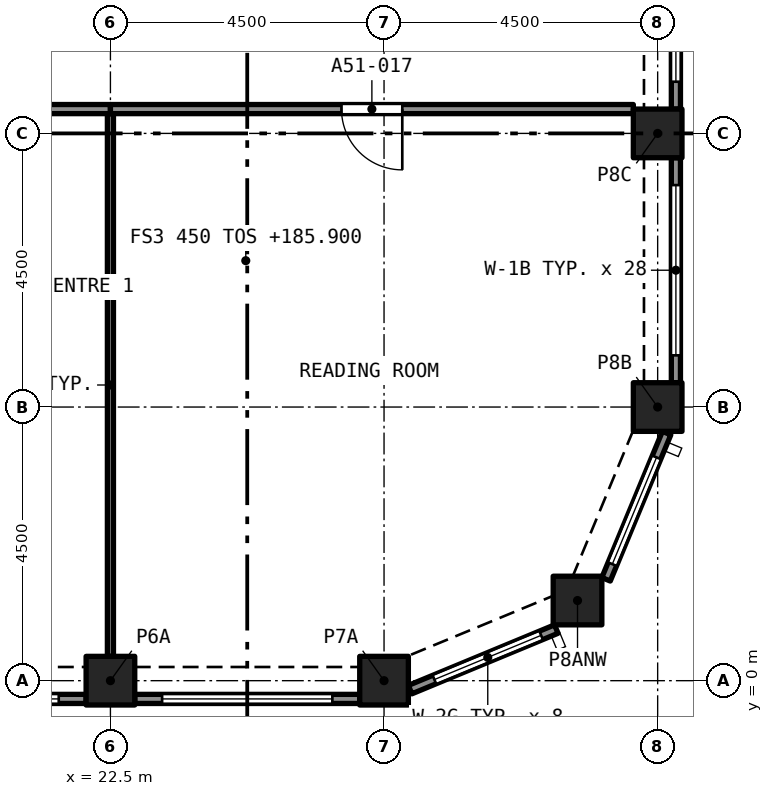
"""IFC4 building model, lengths in metres.
Left out: names, types, materials, properties, quantities, classifications, styles, units other than length and angle.
Written with IfcOpenShell. Run it as: python <this file> out.ifc"""

import sys

from ifc_helpers import new_model, si_unit, direction, frame, frame_2d, origin, origin_2d, place, context, subcontext, project, spatial, rectangle, extrude, element, fill, save


model = new_model("IFC4")
c1 = context("Model", 3, precision=1e-05, world=origin(), true_north=direction((0.0, 1.0)))
c2 = subcontext(c1, "Body", "Model", "MODEL_VIEW")
j1 = project(units=[si_unit("LENGTHUNIT", "METRE"), si_unit("PLANEANGLEUNIT", "RADIAN")], contexts=[c1])
p1 = place(None, origin())
s1 = spatial("IfcSite", under=j1, at=p1, CompositionType="ELEMENT")
p2 = place(p1, origin())
s2 = spatial("IfcBuilding", under=s1, at=p2, CompositionType="ELEMENT")
p3 = place(p2, frame((0.0, 0.0, 185.9)))
s3 = spatial("IfcBuildingStorey", under=s2, at=p3, CompositionType="ELEMENT", Elevation=185.9)
for number, where, z_axis, x_axis in (
    (1, (22.5, 0.0, 0.0), (0.0, 0.0, 1.0), (1.0, 0.0, 0.0)),
    (2, (27.0, 0.0, 0.0), (0.0, 0.0, 1.0), (1.0, 0.0, 0.0)),
    (3, (30.182, 1.318, 0.0), (0.0, 0.0, 1.0), (1.0, 0.0, 0.0)),
    (4, (31.5, 4.5, 0.0), (0.0, 0.0, 1.0), (1.0, 0.0, 0.0)),
    (5, (31.5, 9.0, 0.0), (0.0, 0.0, 1.0), (1.0, 0.0, 0.0)),
):
    element("IfcColumn", number, at=place(p3, frame(where, z_axis=z_axis, x_axis=x_axis)), inside=s3, PredefinedType="COLUMN", context=c2, shape_type="SweptSolid", body=[
        extrude(rectangle(XDim=0.8, YDim=0.8, at=origin_2d()), origin(), (0.0, 0.0, 1.0), 3.2),
    ])
p4 = place(p3, frame((29.833, 0.849, 0.0), z_axis=(0.0, 0.0, 1.0), x_axis=(-0.923885342263, -0.382669406082, 0.0)))
e6 = element("IfcWall", 6, at=p4, inside=s3, PredefinedType="SOLIDWALL", context=c2, shape_type="SweptSolid", body=[
    extrude(rectangle(XDim=2.602, YDim=0.15, at=frame_2d((1.301, 0.0))), origin(), (0.0, 0.0, 1.0), 3.2),
])
p5 = place(p4, frame((0.27, 0.0, 0.45)))
e7 = element("IfcOpeningElement", 7, at=p5, cuts=e6, PredefinedType="OPENING", context=c2, shape_type="SweptSolid", body=[
    extrude(rectangle(XDim=1.9, YDim=1.95, at=frame_2d((0.95, 0.975))), frame((0.0, 0.085, 0.0), z_axis=(0.0, -1.0, 0.0), x_axis=(1.0, 0.0, 0.0)), (0.0, 0.0, 1.0), 0.17),
])
p6 = place(p3, frame((31.647, 4.071, 0.0), z_axis=(0.0, 0.0, 1.0), x_axis=(-0.382669406082, -0.923885342263, 0.0)))
e8 = element("IfcWall", 8, at=p6, inside=s3, PredefinedType="SOLIDWALL", context=c2, shape_type="SweptSolid", body=[
    extrude(rectangle(XDim=2.602, YDim=0.15, at=frame_2d((1.301, 0.0))), origin(), (0.0, 0.0, 1.0), 3.2),
])
p7 = place(p6, frame((0.432, 0.0, 0.45)))
e9 = element("IfcOpeningElement", 9, at=p7, cuts=e8, PredefinedType="OPENING", context=c2, shape_type="SweptSolid", body=[
    extrude(rectangle(XDim=1.9, YDim=1.95, at=frame_2d((0.95, 0.975))), frame((0.0, 0.085, 0.0), z_axis=(0.0, -1.0, 0.0), x_axis=(1.0, 0.0, 0.0)), (0.0, 0.0, 1.0), 0.17),
])
p8 = place(p3, frame((31.8, 8.6, 0.0), z_axis=(0.0, 0.0, 1.0), x_axis=(0.0, -1.0, 0.0)))
e10 = element("IfcWall", 10, at=p8, inside=s3, PredefinedType="SOLIDWALL", context=c2, shape_type="SweptSolid", body=[
    extrude(rectangle(XDim=3.7, YDim=0.15, at=frame_2d((1.85, 0.0))), origin(), (0.0, 0.0, 1.0), 3.2),
])
p9 = place(p8, frame((0.45, 0.0, 0.45)))
e11 = element("IfcOpeningElement", 11, at=p9, cuts=e10, PredefinedType="OPENING", context=c2, shape_type="SweptSolid", body=[
    extrude(rectangle(XDim=2.8, YDim=1.95, at=frame_2d((1.4, 0.975))), frame((0.0, 0.085, 0.0), z_axis=(0.0, -1.0, 0.0), x_axis=(1.0, 0.0, 0.0)), (0.0, 0.0, 1.0), 0.17),
])
p10 = place(p3, frame((31.8, 13.1, 0.0), z_axis=(0.0, 0.0, 1.0), x_axis=(0.0, -1.0, 0.0)))
e12 = element("IfcWall", 12, at=p10, inside=s3, PredefinedType="SOLIDWALL", context=c2, shape_type="SweptSolid", body=[
    extrude(rectangle(XDim=3.7, YDim=0.15, at=frame_2d((1.85, 0.0))), origin(), (0.0, 0.0, 1.0), 3.2),
])
p11 = place(p10, frame((0.45, 0.0, 0.45)))
e13 = element("IfcOpeningElement", 13, at=p11, cuts=e12, PredefinedType="OPENING", context=c2, shape_type="SweptSolid", body=[
    extrude(rectangle(XDim=2.8, YDim=1.95, at=frame_2d((1.4, 0.975))), frame((0.0, 0.085, 0.0), z_axis=(0.0, -1.0, 0.0), x_axis=(1.0, 0.0, 0.0)), (0.0, 0.0, 1.0), 0.17),
])
p12 = place(p3, frame((22.1, -0.3, 0.0), z_axis=(0.0, 0.0, 1.0), x_axis=(-1.0, 0.0, 0.0)))
e14 = element("IfcWall", 14, at=p12, inside=s3, PredefinedType="SOLIDWALL", context=c2, shape_type="SweptSolid", body=[
    extrude(rectangle(XDim=3.7, YDim=0.15, at=frame_2d((1.85, 0.0))), origin(), (0.0, 0.0, 1.0), 3.2),
])
p13 = place(p12, frame((0.45, 0.0, 0.45)))
e15 = element("IfcOpeningElement", 15, at=p13, cuts=e14, PredefinedType="OPENING", context=c2, shape_type="SweptSolid", body=[
    extrude(rectangle(XDim=2.8, YDim=1.95, at=frame_2d((1.4, 0.975))), frame((0.0, 0.085, 0.0), z_axis=(0.0, -1.0, 0.0), x_axis=(1.0, 0.0, 0.0)), (0.0, 0.0, 1.0), 0.17),
])
p14 = place(p3, frame((26.6, -0.3, 0.0), z_axis=(0.0, 0.0, 1.0), x_axis=(-1.0, 0.0, 0.0)))
e16 = element("IfcWall", 16, at=p14, inside=s3, PredefinedType="SOLIDWALL", context=c2, shape_type="SweptSolid", body=[
    extrude(rectangle(XDim=3.7, YDim=0.15, at=frame_2d((1.85, 0.0))), origin(), (0.0, 0.0, 1.0), 3.2),
])
p15 = place(p14, frame((0.45, 0.0, 0.45)))
e17 = element("IfcOpeningElement", 17, at=p15, cuts=e16, PredefinedType="OPENING", context=c2, shape_type="SweptSolid", body=[
    extrude(rectangle(XDim=2.8, YDim=1.95, at=frame_2d((1.4, 0.975))), frame((0.0, 0.085, 0.0), z_axis=(0.0, -1.0, 0.0), x_axis=(1.0, 0.0, 0.0)), (0.0, 0.0, 1.0), 0.17),
])
p16 = place(p3, frame((22.5, 0.4, 0.0), z_axis=(0.0, 0.0, 1.0), x_axis=(0.0, 1.0, 0.0)))
e18 = element("IfcWall", 18, at=p16, inside=s3, PredefinedType="PARTITIONING", context=c2, shape_type="SweptSolid", body=[
    extrude(rectangle(XDim=8.925, YDim=0.1, at=frame_2d((4.462, 0.0))), origin(), (0.0, 0.0, 1.0), 2.75),
])
p17 = place(p3, frame((22.5, 9.4, 0.0), z_axis=(0.0, 0.0, 1.0), x_axis=(-1.0, 0.0, 0.0)))
e19 = element("IfcWall", 19, at=p17, inside=s3, PredefinedType="PARTITIONING", context=c2, shape_type="SweptSolid", body=[
    extrude(rectangle(XDim=4.1, YDim=0.15, at=frame_2d((2.05, 0.0))), origin(), (0.0, 0.0, 1.0), 2.75),
])
p18 = place(p17, frame((1.75, 0.0, 0.0)))
e20 = element("IfcOpeningElement", 20, at=p18, cuts=e19, PredefinedType="OPENING", context=c2, shape_type="SweptSolid", body=[
    extrude(rectangle(XDim=1.0, YDim=2.1, at=frame_2d((0.5, 1.05))), frame((0.0, 0.085, 0.0), z_axis=(0.0, -1.0, 0.0), x_axis=(1.0, 0.0, 0.0)), (0.0, 0.0, 1.0), 0.17),
])
p19 = place(p3, frame((31.1, 9.4, 0.0), z_axis=(0.0, 0.0, 1.0), x_axis=(-1.0, 0.0, 0.0)))
e21 = element("IfcWall", 21, at=p19, inside=s3, PredefinedType="PARTITIONING", context=c2, shape_type="SweptSolid", body=[
    extrude(rectangle(XDim=8.6, YDim=0.15, at=frame_2d((4.3, 0.0))), origin(), (0.0, 0.0, 1.0), 2.75),
])
p20 = place(p19, frame((3.8, 0.0, 0.0)))
e22 = element("IfcOpeningElement", 22, at=p20, cuts=e21, PredefinedType="OPENING", context=c2, shape_type="SweptSolid", body=[
    extrude(rectangle(XDim=1.0, YDim=2.1, at=frame_2d((0.5, 1.05))), frame((0.0, 0.085, 0.0), z_axis=(0.0, -1.0, 0.0), x_axis=(1.0, 0.0, 0.0)), (0.0, 0.0, 1.0), 0.17),
])
p21 = place(p5, origin())
e23 = element("IfcWindow", 23, at=p21, inside=s3, PartitioningType="SINGLE_PANEL", PredefinedType="WINDOW", context=c2, shape_type="SweptSolid", body=[
    extrude(rectangle(XDim=1.9, YDim=1.95, at=frame_2d((0.95, 0.975))), frame((0.0, 0.03, 0.0), z_axis=(0.0, -1.0, 0.0), x_axis=(1.0, 0.0, 0.0)), (0.0, 0.0, 1.0), 0.06),
])
fill(e7, e23)
p22 = place(p7, origin())
e24 = element("IfcWindow", 24, at=p22, inside=s3, PartitioningType="SINGLE_PANEL", PredefinedType="WINDOW", context=c2, shape_type="SweptSolid", body=[
    extrude(rectangle(XDim=1.9, YDim=1.95, at=frame_2d((0.95, 0.975))), frame((0.0, 0.03, 0.0), z_axis=(0.0, -1.0, 0.0), x_axis=(1.0, 0.0, 0.0)), (0.0, 0.0, 1.0), 0.06),
])
fill(e9, e24)
p23 = place(p9, origin())
e25 = element("IfcWindow", 25, at=p23, inside=s3, PartitioningType="SINGLE_PANEL", PredefinedType="WINDOW", context=c2, shape_type="SweptSolid", body=[
    extrude(rectangle(XDim=2.8, YDim=1.95, at=frame_2d((1.4, 0.975))), frame((0.0, 0.03, 0.0), z_axis=(0.0, -1.0, 0.0), x_axis=(1.0, 0.0, 0.0)), (0.0, 0.0, 1.0), 0.06),
])
fill(e11, e25)
p24 = place(p11, origin())
e26 = element("IfcWindow", 26, at=p24, inside=s3, PartitioningType="SINGLE_PANEL", PredefinedType="WINDOW", context=c2, shape_type="SweptSolid", body=[
    extrude(rectangle(XDim=2.8, YDim=1.95, at=frame_2d((1.4, 0.975))), frame((0.0, 0.03, 0.0), z_axis=(0.0, -1.0, 0.0), x_axis=(1.0, 0.0, 0.0)), (0.0, 0.0, 1.0), 0.06),
])
fill(e13, e26)
p25 = place(p13, origin())
e27 = element("IfcWindow", 27, at=p25, inside=s3, PartitioningType="SINGLE_PANEL", PredefinedType="WINDOW", context=c2, shape_type="SweptSolid", body=[
    extrude(rectangle(XDim=2.8, YDim=1.95, at=frame_2d((1.4, 0.975))), frame((0.0, 0.03, 0.0), z_axis=(0.0, -1.0, 0.0), x_axis=(1.0, 0.0, 0.0)), (0.0, 0.0, 1.0), 0.06),
])
fill(e15, e27)
p26 = place(p15, origin())
e28 = element("IfcWindow", 28, at=p26, inside=s3, PartitioningType="SINGLE_PANEL", PredefinedType="WINDOW", context=c2, shape_type="SweptSolid", body=[
    extrude(rectangle(XDim=2.8, YDim=1.95, at=frame_2d((1.4, 0.975))), frame((0.0, 0.03, 0.0), z_axis=(0.0, -1.0, 0.0), x_axis=(1.0, 0.0, 0.0)), (0.0, 0.0, 1.0), 0.06),
])
fill(e17, e28)
p27 = place(p20, origin())
e29 = element("IfcDoor", 29, at=p27, inside=s3, OperationType="SINGLE_SWING_RIGHT", PredefinedType="DOOR", context=c2, shape_type="SweptSolid", body=[
    extrude(rectangle(XDim=1.0, YDim=2.1, at=frame_2d((0.5, 1.05))), frame((0.0, 0.025, 0.0), z_axis=(0.0, -1.0, 0.0), x_axis=(1.0, 0.0, 0.0)), (0.0, 0.0, 1.0), 0.05),
])
fill(e22, e29)
save(model, sys.argv[1])
